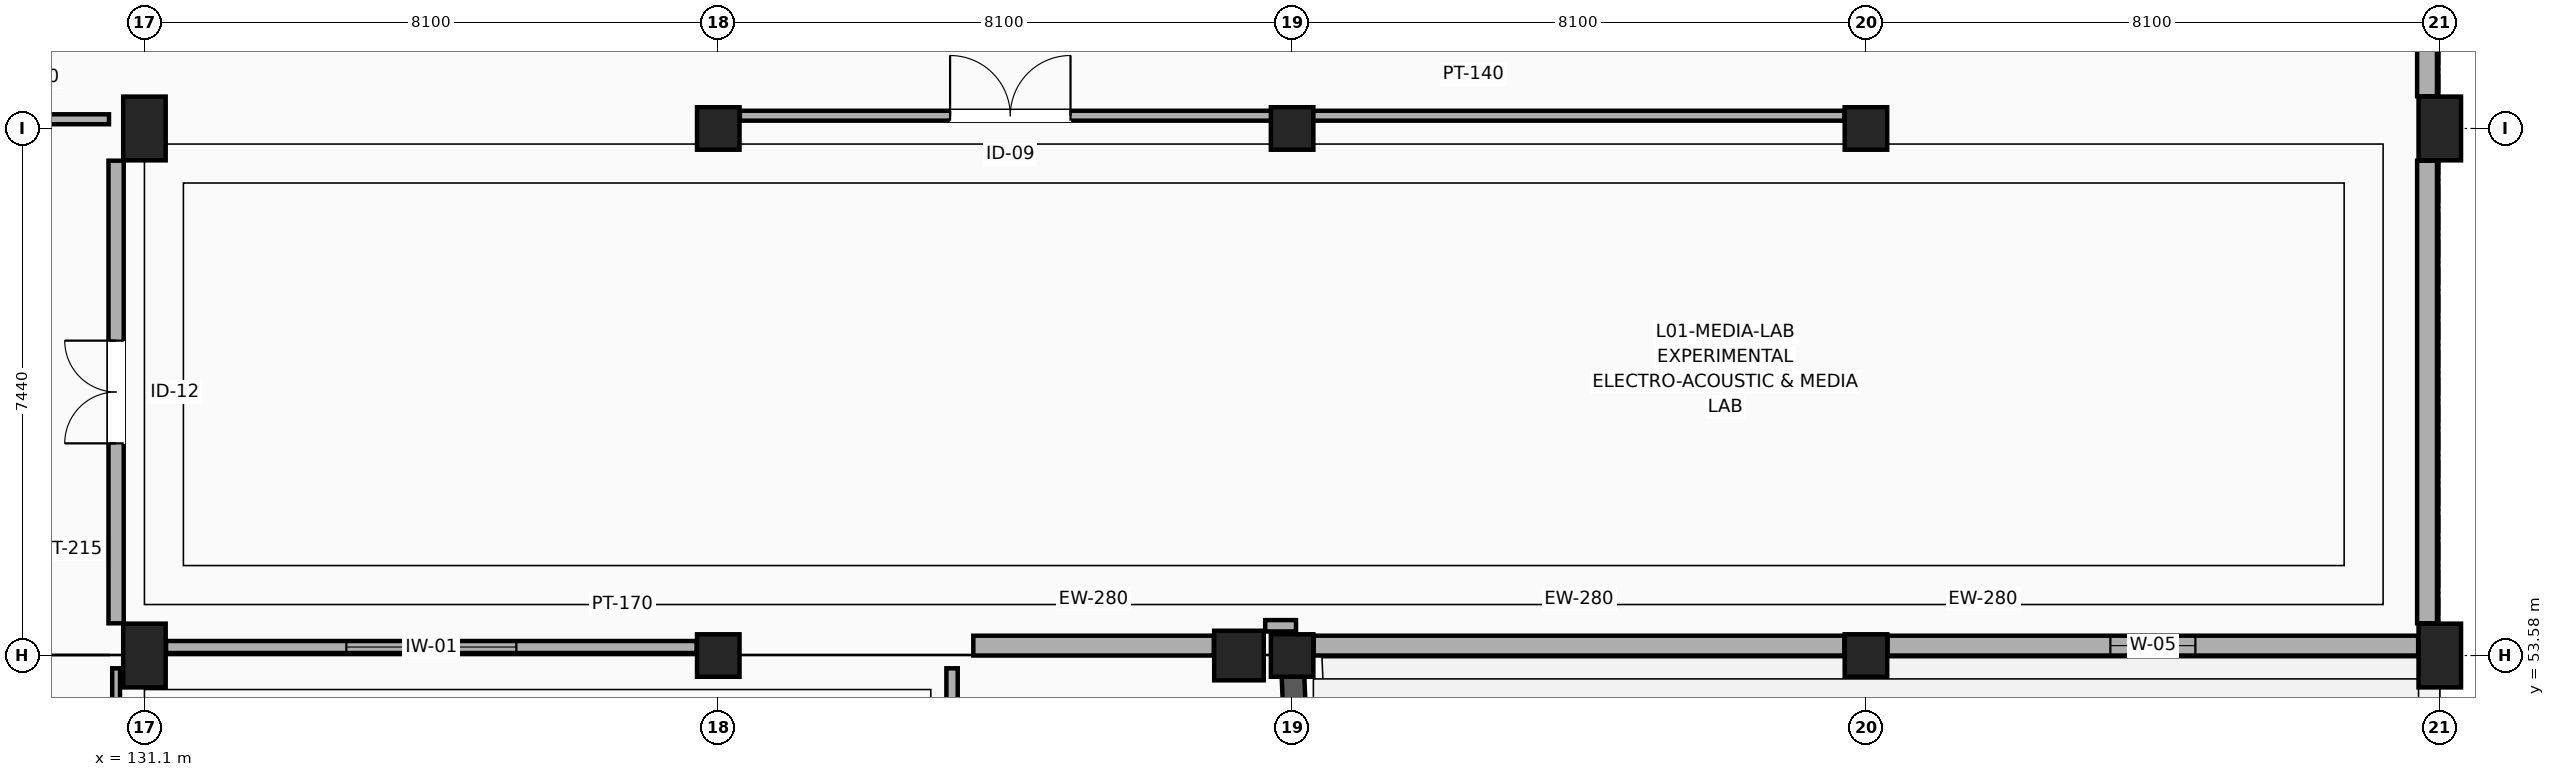
"""IFC4 building model, lengths in metres.
Left out: names, types, materials, properties, quantities, classifications, styles, units other than length and angle.
Written with IfcOpenShell. Run it as: python <this file> out.ifc"""

import sys

from ifc_helpers import new_model, si_unit, direction, frame, frame_2d, origin, origin_2d, place, context, subcontext, project, spatial, rectangle, extrude, element, fill, save


model = new_model("IFC4")
c1 = context("Model", 3, precision=1e-05, world=origin(), true_north=direction((0.0, 1.0)))
c2 = subcontext(c1, "Body", "Model", "MODEL_VIEW")
j1 = project(units=[si_unit("LENGTHUNIT", "METRE"), si_unit("PLANEANGLEUNIT", "RADIAN")], contexts=[c1])
p1 = place(None, origin())
s1 = spatial("IfcSite", under=j1, at=p1, CompositionType="ELEMENT")
p2 = place(p1, origin())
s2 = spatial("IfcBuilding", under=s1, at=p2, CompositionType="ELEMENT")
p3 = place(p2, frame((0.0, 0.0, 5.4)))
s3 = spatial("IfcBuildingStorey", under=s2, at=p3, CompositionType="ELEMENT", Elevation=5.4)
for number, where, z_axis, x_axis in (
    (1, (131.1, 53.58, 0.0), (0.0, 0.0, 1.0), (1.0, 0.0, 0.0)),
    (2, (131.1, 61.02, 0.0), (0.0, 0.0, 1.0), (1.0, 0.0, 0.0)),
):
    element("IfcColumn", number, at=place(p3, frame(where, z_axis=z_axis, x_axis=x_axis)), inside=s3, PredefinedType="COLUMN", context=c2, shape_type="SweptSolid", body=[
        extrude(rectangle(XDim=0.6, YDim=0.9, at=origin_2d()), origin(), (0.0, 0.0, 1.0), 4.8),
    ])
for number, where, z_axis, x_axis in (
    (3, (139.2, 53.58, 0.0), (0.0, 0.0, 1.0), (1.0, 0.0, 0.0)),
    (4, (139.2, 61.02, 0.0), (0.0, 0.0, 1.0), (1.0, 0.0, 0.0)),
    (5, (147.3, 53.58, 0.0), (0.0, 0.0, 1.0), (1.0, 0.0, 0.0)),
    (6, (147.3, 61.02, 0.0), (0.0, 0.0, 1.0), (1.0, 0.0, 0.0)),
    (7, (155.4, 53.58, 0.0), (0.0, 0.0, 1.0), (1.0, 0.0, 0.0)),
    (8, (155.4, 61.02, 0.0), (0.0, 0.0, 1.0), (1.0, 0.0, 0.0)),
):
    element("IfcColumn", number, at=place(p3, frame(where, z_axis=z_axis, x_axis=x_axis)), inside=s3, PredefinedType="COLUMN", context=c2, shape_type="SweptSolid", body=[
        extrude(rectangle(XDim=0.6, YDim=0.6, at=origin_2d()), origin(), (0.0, 0.0, 1.0), 4.8),
    ])
for number, where, z_axis, x_axis in (
    (9, (163.5, 53.58, 0.0), (0.0, 0.0, 1.0), (1.0, 0.0, 0.0)),
    (10, (163.5, 61.02, 0.0), (0.0, 0.0, 1.0), (1.0, 0.0, 0.0)),
):
    element("IfcColumn", number, at=place(p3, frame(where, z_axis=z_axis, x_axis=x_axis)), inside=s3, PredefinedType="COLUMN", context=c2, shape_type="SweptSolid", body=[
        extrude(rectangle(XDim=0.6, YDim=0.9, at=origin_2d()), origin(), (0.0, 0.0, 1.0), 4.8),
    ])
p4 = place(p3, frame((146.55, 53.58, 0.0), z_axis=(0.0, 0.0, 1.0), x_axis=(1.0, 0.0, 0.0)))
e11 = element("IfcColumn", 11, at=p4, inside=s3, PredefinedType="COLUMN", context=c2, shape_type="SweptSolid", body=[
    extrude(rectangle(XDim=0.7, YDim=0.7, at=origin_2d()), origin(), (0.0, 0.0, 1.0), 7.035),
])
p5 = place(p3, frame((147.3, 53.58, 0.0), z_axis=(0.0, 0.0, 1.0), x_axis=(0.042491348944, -0.999096834779, 0.0)))
e12 = element("IfcWall", 12, at=p5, inside=s3, PredefinedType="SHEAR", context=c2, shape_type="SweptSolid", body=[
    extrude(rectangle(XDim=4.66, YDim=0.32, at=frame_2d((2.33, 0.0))), origin(), (0.0, 0.0, 1.0), 7.417),
])
p6 = place(p3, frame((142.8, 53.72, 0.0), z_axis=(0.0, 0.0, 1.0), x_axis=(1.0, 0.0, 0.0)))
e13 = element("IfcWall", 13, at=p6, inside=s3, PredefinedType="SOLIDWALL", context=c2, shape_type="SweptSolid", body=[
    extrude(rectangle(XDim=3.395, YDim=0.28, at=frame_2d((1.698, 0.0))), origin(), (0.0, 0.0, 1.0), 3.687),
])
p7 = place(p3, frame((147.605, 53.72, 0.0), z_axis=(0.0, 0.0, 1.0), x_axis=(1.0, 0.0, 0.0)))
e14 = element("IfcWall", 14, at=p7, inside=s3, PredefinedType="SOLIDWALL", context=c2, shape_type="SweptSolid", body=[
    extrude(rectangle(XDim=7.49, YDim=0.28, at=frame_2d((3.745, 0.0))), origin(), (0.0, 0.0, 1.0), 3.987),
])
p8 = place(p3, frame((155.705, 53.72, 0.0), z_axis=(0.0, 0.0, 1.0), x_axis=(1.0, 0.0, 0.0)))
e15 = element("IfcWall", 15, at=p8, inside=s3, PredefinedType="SOLIDWALL", context=c2, shape_type="SweptSolid", body=[
    extrude(rectangle(XDim=7.49, YDim=0.28, at=frame_2d((3.745, 0.0))), origin(), (0.0, 0.0, 1.0), 3.687),
])
p9 = place(p8, frame((3.145, 0.0, 0.95)))
e16 = element("IfcOpeningElement", 16, at=p9, cuts=e15, PredefinedType="OPENING", context=c2, shape_type="SweptSolid", body=[
    extrude(rectangle(XDim=1.2, YDim=1.8, at=frame_2d((0.6, 0.9))), frame((0.0, 0.15, 0.0), z_axis=(0.0, -1.0, 0.0), x_axis=(1.0, 0.0, 0.0)), (0.0, 0.0, 1.0), 0.3),
])
p10 = place(p3, frame((163.32, 54.035, 0.0), z_axis=(0.0, 0.0, 1.0), x_axis=(0.0, 1.0, 0.0)))
e17 = element("IfcWall", 17, at=p10, inside=s3, PredefinedType="SOLIDWALL", context=c2, shape_type="SweptSolid", body=[
    extrude(rectangle(XDim=6.53, YDim=0.28, at=frame_2d((3.265, 0.0))), origin(), (0.0, 0.0, 1.0), 4.187),
])
p11 = place(p3, frame((163.32, 61.475, 0.0), z_axis=(0.0, 0.0, 1.0), x_axis=(0.0, 1.0, 0.0)))
e18 = element("IfcWall", 18, at=p11, inside=s3, PredefinedType="SOLIDWALL", context=c2, shape_type="SweptSolid", body=[
    extrude(rectangle(XDim=6.53, YDim=0.28, at=frame_2d((3.265, 0.0))), origin(), (0.0, 0.0, 1.0), 4.187),
])
p12 = place(p3, frame((130.7, 50.0, 0.0), z_axis=(0.0, 0.0, 1.0), x_axis=(0.0, 1.0, 0.0)))
e19 = element("IfcWall", 19, at=p12, inside=s3, PredefinedType="PARTITIONING", context=c2, shape_type="SweptSolid", body=[
    extrude(rectangle(XDim=3.4, YDim=0.11, at=frame_2d((1.7, 0.0))), origin(), (0.0, 0.0, 1.0), 3.687),
])
p13 = place(p12, frame((0.58, 0.0, 0.0)))
e20 = element("IfcOpeningElement", 20, at=p13, cuts=e19, PredefinedType="OPENING", context=c2, shape_type="SweptSolid", body=[
    extrude(rectangle(XDim=1.95, YDim=2.45, at=frame_2d((0.975, 1.225))), frame((0.0, 0.065, 0.0), z_axis=(0.0, -1.0, 0.0), x_axis=(1.0, 0.0, 0.0)), (0.0, 0.0, 1.0), 0.13),
])
p14 = place(p3, frame((125.0, 61.15, 0.0), z_axis=(0.0, 0.0, 1.0), x_axis=(1.0, 0.0, 0.0)))
e21 = element("IfcWall", 21, at=p14, inside=s3, PredefinedType="PARTITIONING", context=c2, shape_type="SweptSolid", body=[
    extrude(rectangle(XDim=5.6, YDim=0.14, at=frame_2d((2.8, 0.0))), origin(), (0.0, 0.0, 1.0), 3.687),
])
p15 = place(p14, frame((1.364, 0.0, 0.0)))
e22 = element("IfcOpeningElement", 22, at=p15, cuts=e21, PredefinedType="OPENING", context=c2, shape_type="SweptSolid", body=[
    extrude(rectangle(XDim=1.5, YDim=2.2, at=frame_2d((0.75, 1.1))), frame((0.0, 0.08, 0.0), z_axis=(0.0, -1.0, 0.0), x_axis=(1.0, 0.0, 0.0)), (0.0, 0.0, 1.0), 0.16),
])
p16 = place(p3, frame((130.7, 54.035, 0.0), z_axis=(0.0, 0.0, 1.0), x_axis=(0.0, 1.0, 0.0)))
e23 = element("IfcWall", 23, at=p16, inside=s3, PredefinedType="PARTITIONING", context=c2, shape_type="SweptSolid", body=[
    extrude(rectangle(XDim=6.53, YDim=0.215, at=frame_2d((3.265, 0.0))), origin(), (0.0, 0.0, 1.0), 4.505),
])
p17 = place(p16, frame((2.54, 0.0, 0.0)))
e24 = element("IfcOpeningElement", 24, at=p17, cuts=e23, PredefinedType="OPENING", context=c2, shape_type="SweptSolid", body=[
    extrude(rectangle(XDim=1.45, YDim=2.3, at=frame_2d((0.725, 1.15))), frame((0.0, 0.117, 0.0), z_axis=(0.0, -1.0, 0.0), x_axis=(1.0, 0.0, 0.0)), (0.0, 0.0, 1.0), 0.235),
])
p18 = place(p3, frame((131.405, 53.7, 0.0), z_axis=(0.0, 0.0, 1.0), x_axis=(1.0, 0.0, 0.0)))
e25 = element("IfcWall", 25, at=p18, inside=s3, PredefinedType="PARTITIONING", context=c2, shape_type="SweptSolid", body=[
    extrude(rectangle(XDim=7.49, YDim=0.17, at=frame_2d((3.745, 0.0))), origin(), (0.0, 0.0, 1.0), 3.987),
])
p19 = place(p18, frame((2.545, 0.0, 1.05)))
e26 = element("IfcOpeningElement", 26, at=p19, cuts=e25, PredefinedType="OPENING", context=c2, shape_type="SweptSolid", body=[
    extrude(rectangle(XDim=2.4, YDim=1.4, at=frame_2d((1.2, 0.7))), frame((0.0, 0.095, 0.0), z_axis=(0.0, -1.0, 0.0), x_axis=(1.0, 0.0, 0.0)), (0.0, 0.0, 1.0), 0.19),
])
p20 = place(p3, frame((139.505, 61.2, 0.0), z_axis=(0.0, 0.0, 1.0), x_axis=(1.0, 0.0, 0.0)))
e27 = element("IfcWall", 27, at=p20, inside=s3, PredefinedType="PARTITIONING", context=c2, shape_type="SweptSolid", body=[
    extrude(rectangle(XDim=15.59, YDim=0.14, at=frame_2d((7.795, 0.0))), origin(), (0.0, 0.0, 1.0), 3.687),
])
p21 = place(p20, frame((2.967, 0.0, 0.0)))
e28 = element("IfcOpeningElement", 28, at=p21, cuts=e27, PredefinedType="OPENING", context=c2, shape_type="SweptSolid", body=[
    extrude(rectangle(XDim=1.7, YDim=2.35, at=frame_2d((0.85, 1.175))), frame((0.0, 0.08, 0.0), z_axis=(0.0, -1.0, 0.0), x_axis=(1.0, 0.0, 0.0)), (0.0, 0.0, 1.0), 0.16),
])
p22 = place(p3, frame((142.5, 50.0, 0.0), z_axis=(0.0, 0.0, 1.0), x_axis=(0.0, 1.0, 0.0)))
e29 = element("IfcWall", 29, at=p22, inside=s3, PredefinedType="PARTITIONING", context=c2, shape_type="SweptSolid", body=[
    extrude(rectangle(XDim=3.4, YDim=0.16, at=frame_2d((1.7, 0.0))), origin(), (0.0, 0.0, 1.0), 3.687),
])
p23 = place(p3, frame((146.92, 54.0, 0.0), z_axis=(0.0, 0.0, 1.0), x_axis=(1.0, 0.0, 0.0)))
e30 = element("IfcWall", 30, at=p23, inside=s3, PredefinedType="PARTITIONING", context=c2, shape_type="SweptSolid", body=[
    extrude(rectangle(XDim=0.435, YDim=0.16, at=frame_2d((0.218, 0.0))), origin(), (0.0, 0.0, 1.0), 3.837),
])
p24 = place(p9, origin())
e31 = element("IfcWindow", 31, at=p24, inside=s3, PartitioningType="SINGLE_PANEL", PredefinedType="WINDOW", context=c2, shape_type="SweptSolid", body=[
    extrude(rectangle(XDim=1.2, YDim=1.8, at=frame_2d((0.6, 0.9))), frame((0.0, 0.03, 0.0), z_axis=(0.0, -1.0, 0.0), x_axis=(1.0, 0.0, 0.0)), (0.0, 0.0, 1.0), 0.06),
])
fill(e16, e31)
p25 = place(p17, origin())
e32 = element("IfcDoor", 32, at=p25, inside=s3, OperationType="DOUBLE_DOOR_SINGLE_SWING", PredefinedType="DOOR", context=c2, shape_type="SweptSolid", body=[
    extrude(rectangle(XDim=1.45, YDim=2.3, at=frame_2d((0.725, 1.15))), frame((0.0, 0.025, 0.0), z_axis=(0.0, -1.0, 0.0), x_axis=(1.0, 0.0, 0.0)), (0.0, 0.0, 1.0), 0.05),
])
fill(e24, e32)
p26 = place(p19, origin())
e33 = element("IfcWindow", 33, at=p26, inside=s3, PartitioningType="SINGLE_PANEL", PredefinedType="WINDOW", context=c2, shape_type="SweptSolid", body=[
    extrude(rectangle(XDim=2.4, YDim=1.4, at=frame_2d((1.2, 0.7))), frame((0.0, 0.03, 0.0), z_axis=(0.0, -1.0, 0.0), x_axis=(1.0, 0.0, 0.0)), (0.0, 0.0, 1.0), 0.06),
])
fill(e26, e33)
p27 = place(p21, origin())
e34 = element("IfcDoor", 34, at=p27, inside=s3, OperationType="DOUBLE_DOOR_SINGLE_SWING", PredefinedType="DOOR", context=c2, shape_type="SweptSolid", body=[
    extrude(rectangle(XDim=1.7, YDim=2.35, at=frame_2d((0.85, 1.175))), frame((0.0, 0.025, 0.0), z_axis=(0.0, -1.0, 0.0), x_axis=(1.0, 0.0, 0.0)), (0.0, 0.0, 1.0), 0.05),
])
fill(e28, e34)
save(model, sys.argv[1])
